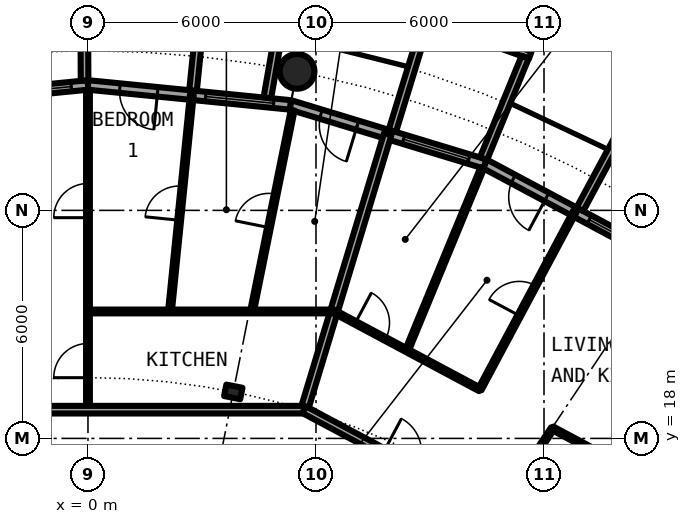
"""IFC4 building model, lengths in metres.
Left out: names, types, materials, properties, quantities, classifications, styles, units other than length and angle.
Written with IfcOpenShell. Run it as: python <this file> out.ifc"""

import sys

from ifc_helpers import new_model, si_unit, direction, frame, frame_2d, origin, origin_2d, place, context, subcontext, project, spatial, rectangle, circle, hollow_circle, i_section, extrude, element, fill, save


model = new_model("IFC4")
c1 = context("Model", 3, precision=1e-05, world=origin(), true_north=direction((0.0, 1.0)))
c2 = subcontext(c1, "Body", "Model", "MODEL_VIEW")
j1 = project(units=[si_unit("LENGTHUNIT", "METRE"), si_unit("PLANEANGLEUNIT", "RADIAN")], contexts=[c1])
p1 = place(None, origin())
s1 = spatial("IfcSite", under=j1, at=p1, CompositionType="ELEMENT")
p2 = place(p1, origin())
s2 = spatial("IfcBuilding", under=s1, at=p2, CompositionType="ELEMENT")
p3 = place(p2, frame((0.0, 0.0, 117.75)))
s3 = spatial("IfcBuildingStorey", under=s2, at=p3, CompositionType="ELEMENT", Elevation=117.75)
p4 = place(p3, frame((5.501, 27.658, 0.0), z_axis=(0.0, 0.0, 1.0), x_axis=(1.0, 0.0, 0.0)))
e1 = element("IfcColumn", 1, at=p4, inside=s3, PredefinedType="COLUMN", context=c2, shape_type="SweptSolid", body=[
    extrude(hollow_circle(Radius=0.457, WallThickness=0.04, at=origin_2d()), origin(), (0.0, 0.0, 1.0), 3.05),
])
p5 = place(p3, frame((3.824, 19.223, 0.0), z_axis=(0.0, 0.0, 1.0), x_axis=(0.195090322016, 0.980785280403, 0.0)))
e2 = element("IfcColumn", 2, at=p5, inside=s3, PredefinedType="COLUMN", context=c2, shape_type="SweptSolid", body=[
    extrude(i_section(OverallWidth=0.307, OverallDepth=0.432, WebThickness=0.021, FlangeThickness=0.04, FilletRadius=0.027, at=origin_2d()), origin(), (0.0, 0.0, 1.0), 3.05),
])
p6 = place(p3, frame((15.167, 22.699, 0.0), z_axis=(0.0, 0.0, 1.0), x_axis=(-0.881915646801, 0.471407246368, 0.0)))
e3 = element("IfcWall", 3, at=p6, inside=s3, PredefinedType="SOLIDWALL", context=c2, shape_type="SweptSolid", body=[
    extrude(rectangle(XDim=5.352, YDim=0.25, at=frame_2d((2.676, 0.0))), origin(), (0.0, 0.0, 1.0), 2.7),
])
p7 = place(p6, frame((0.441, 0.0, 0.3)))
e4 = element("IfcOpeningElement", 4, at=p7, cuts=e3, PredefinedType="OPENING", context=c2, shape_type="SweptSolid", body=[
    extrude(rectangle(XDim=1.8, YDim=2.1, at=frame_2d((0.9, 1.05))), frame((0.0, 0.135, 0.0), z_axis=(0.0, -1.0, 0.0), x_axis=(1.0, 0.0, 0.0)), (0.0, 0.0, 1.0), 0.27),
])
p8 = place(p6, frame((3.51, 0.0, 0.0)))
e5 = element("IfcOpeningElement", 5, at=p8, cuts=e3, PredefinedType="OPENING", context=c2, shape_type="SweptSolid", body=[
    extrude(rectangle(XDim=1.0, YDim=2.2, at=frame_2d((0.5, 1.1))), frame((0.0, 0.135, 0.0), z_axis=(0.0, -1.0, 0.0), x_axis=(1.0, 0.0, 0.0)), (0.0, 0.0, 1.0), 0.27),
])
p9 = place(p3, frame((12.945, 24.029, -0.03), z_axis=(0.0, 0.0, 1.0), x_axis=(0.474424310775, 0.88029629861, 0.0)))
e6 = element("IfcWall", 6, at=p9, inside=s3, PredefinedType="SOLIDWALL", context=c2, shape_type="SweptSolid", body=[
    extrude(rectangle(XDim=3.006, YDim=0.2, at=frame_2d((1.503, 0.0))), origin(), (0.0, 0.0, 1.0), 2.73),
])
p10 = place(p3, frame((10.447, 25.222, 0.0), z_axis=(0.0, 0.0, 1.0), x_axis=(-0.956965678721, 0.290201119486, 0.0)))
e7 = element("IfcWall", 7, at=p10, inside=s3, PredefinedType="SOLIDWALL", context=c2, shape_type="SweptSolid", body=[
    extrude(rectangle(XDim=5.351, YDim=0.25, at=frame_2d((2.676, 0.0))), origin(), (0.0, 0.0, 1.0), 2.7),
])
p11 = place(p10, frame((0.441, 0.0, 0.3)))
e8 = element("IfcOpeningElement", 8, at=p11, cuts=e7, PredefinedType="OPENING", context=c2, shape_type="SweptSolid", body=[
    extrude(rectangle(XDim=1.8, YDim=2.1, at=frame_2d((0.9, 1.05))), frame((0.0, 0.135, 0.0), z_axis=(0.0, -1.0, 0.0), x_axis=(1.0, 0.0, 0.0)), (0.0, 0.0, 1.0), 0.27),
])
p12 = place(p10, frame((3.51, 0.0, 0.0)))
e9 = element("IfcOpeningElement", 9, at=p12, cuts=e7, PredefinedType="OPENING", context=c2, shape_type="SweptSolid", body=[
    extrude(rectangle(XDim=1.0, YDim=2.2, at=frame_2d((0.5, 1.1))), frame((0.0, 0.135, 0.0), z_axis=(0.0, -1.0, 0.0), x_axis=(1.0, 0.0, 0.0)), (0.0, 0.0, 1.0), 0.27),
])
p13 = place(p3, frame((11.638, 28.084, -0.03), z_axis=(0.0, 0.0, 1.0), x_axis=(-0.941461077774, 0.337121697664, 0.0)))
e10 = element("IfcWall", 10, at=p13, inside=s3, PredefinedType="SOLIDWALL", context=c2, shape_type="SweptSolid", body=[
    extrude(rectangle(XDim=2.993, YDim=0.2, at=frame_2d((1.497, 0.0))), origin(), (0.0, 0.0, 1.0), 2.73),
])
p14 = place(p13, frame((0.457, 0.0, 0.33)))
e11 = element("IfcOpeningElement", 11, at=p14, cuts=e10, PredefinedType="OPENING", context=c2, shape_type="SweptSolid", body=[
    extrude(circle(Radius=1.04, at=frame_2d((1.04, 1.04))), frame((0.0, 0.11, 0.0), z_axis=(0.0, -1.0, 0.0), x_axis=(1.0, 0.0, 0.0)), (0.0, 0.0, 1.0), 0.22),
])
p15 = place(p3, frame((10.409, 25.364, -0.03), z_axis=(0.0, 0.0, 1.0), x_axis=(0.379509886562, 0.925187681501, 0.0)))
e12 = element("IfcWall", 12, at=p15, inside=s3, PredefinedType="SOLIDWALL", context=c2, shape_type="SweptSolid", body=[
    extrude(rectangle(XDim=2.883, YDim=0.2, at=frame_2d((1.441, 0.0))), origin(), (0.0, 0.0, 1.0), 2.73),
])
p16 = place(p3, frame((8.009, 26.092, -0.03), z_axis=(0.0, 0.0, 1.0), x_axis=(0.293406695073, 0.955987715029, 0.0)))
e13 = element("IfcWall", 13, at=p16, inside=s3, PredefinedType="SOLIDWALL", context=c2, shape_type="SweptSolid", body=[
    extrude(rectangle(XDim=3.006, YDim=0.2, at=frame_2d((1.503, 0.0))), origin(), (0.0, 0.0, 1.0), 2.73),
])
p17 = place(p3, frame((5.326, 26.775, 0.0), z_axis=(0.0, 0.0, 1.0), x_axis=(-0.995173996315, 0.098126026407, 0.0)))
e14 = element("IfcWall", 14, at=p17, inside=s3, PredefinedType="SOLIDWALL", context=c2, shape_type="SweptSolid", body=[
    extrude(rectangle(XDim=5.352, YDim=0.25, at=frame_2d((2.676, 0.0))), origin(), (0.0, 0.0, 1.0), 2.7),
])
p18 = place(p17, frame((0.441, 0.0, 0.3)))
e15 = element("IfcOpeningElement", 15, at=p18, cuts=e14, PredefinedType="OPENING", context=c2, shape_type="SweptSolid", body=[
    extrude(rectangle(XDim=1.8, YDim=2.1, at=frame_2d((0.9, 1.05))), frame((0.0, 0.135, 0.0), z_axis=(0.0, -1.0, 0.0), x_axis=(1.0, 0.0, 0.0)), (0.0, 0.0, 1.0), 0.27),
])
p19 = place(p17, frame((3.51, 0.0, 0.0)))
e16 = element("IfcOpeningElement", 16, at=p19, cuts=e14, PredefinedType="OPENING", context=c2, shape_type="SweptSolid", body=[
    extrude(rectangle(XDim=1.0, YDim=2.2, at=frame_2d((0.5, 1.1))), frame((0.0, 0.135, 0.0), z_axis=(0.0, -1.0, 0.0), x_axis=(1.0, 0.0, 0.0)), (0.0, 0.0, 1.0), 0.27),
])
p20 = place(p3, frame((4.72, 26.961, -0.03), z_axis=(0.0, 0.0, 1.0), x_axis=(0.172463232037, 0.98501595601, 0.0)))
e17 = element("IfcWall", 17, at=p20, inside=s3, PredefinedType="SOLIDWALL", context=c2, shape_type="SweptSolid", body=[
    extrude(rectangle(XDim=2.929, YDim=0.2, at=frame_2d((1.464, 0.0))), origin(), (0.0, 0.0, 1.0), 2.73),
])
p21 = place(p3, frame((2.764, 27.153, -0.03), z_axis=(0.0, 0.0, 1.0), x_axis=(0.101505487237, 0.994834979311, 0.0)))
e18 = element("IfcWall", 18, at=p21, inside=s3, PredefinedType="SOLIDWALL", context=c2, shape_type="SweptSolid", body=[
    extrude(rectangle(XDim=3.007, YDim=0.2, at=frame_2d((1.503, 0.0))), origin(), (0.0, 0.0, 1.0), 2.73),
])
p22 = place(p3, frame((0.0, 27.3, 0.0), z_axis=(0.0, 0.0, 1.0), x_axis=(-0.995173996315, -0.098126026407, 0.0)))
e19 = element("IfcWall", 19, at=p22, inside=s3, PredefinedType="SOLIDWALL", context=c2, shape_type="SweptSolid", body=[
    extrude(rectangle(XDim=5.352, YDim=0.25, at=frame_2d((2.676, 0.0))), origin(), (0.0, 0.0, 1.0), 2.7),
])
p23 = place(p22, frame((0.441, 0.0, 0.3)))
e20 = element("IfcOpeningElement", 20, at=p23, cuts=e19, PredefinedType="OPENING", context=c2, shape_type="SweptSolid", body=[
    extrude(rectangle(XDim=1.8, YDim=2.1, at=frame_2d((0.9, 1.05))), frame((0.0, 0.135, 0.0), z_axis=(0.0, -1.0, 0.0), x_axis=(1.0, 0.0, 0.0)), (0.0, 0.0, 1.0), 0.27),
])
p24 = place(p22, frame((3.51, 0.0, 0.0)))
e21 = element("IfcOpeningElement", 21, at=p24, cuts=e19, PredefinedType="OPENING", context=c2, shape_type="SweptSolid", body=[
    extrude(rectangle(XDim=1.0, YDim=2.2, at=frame_2d((0.5, 1.1))), frame((0.0, 0.135, 0.0), z_axis=(0.0, -1.0, 0.0), x_axis=(1.0, 0.0, 0.0)), (0.0, 0.0, 1.0), 0.27),
])
p25 = place(p3, frame((-0.09, 27.417, -0.03), z_axis=(0.0, 0.0, 1.0), x_axis=(-0.00347308367, 0.999993968827, 0.0)))
e22 = element("IfcWall", 22, at=p25, inside=s3, PredefinedType="SOLIDWALL", context=c2, shape_type="SweptSolid", body=[
    extrude(rectangle(XDim=2.882, YDim=0.2, at=frame_2d((1.441, 0.0))), origin(), (0.0, 0.0, 1.0), 2.73),
])
p26 = place(p3, frame((5.69, 18.756, 0.0), z_axis=(0.0, 0.0, 1.0), x_axis=(0.29005838641, 0.957008951094, 0.0)))
e23 = element("IfcWall", 23, at=p26, inside=s3, PredefinedType="PARTITIONING", context=c2, shape_type="SweptSolid", body=[
    extrude(rectangle(XDim=7.574, YDim=0.2, at=frame_2d((3.787, 0.0))), origin(), (0.0, 0.0, 1.0), 2.7),
])
p27 = place(p3, frame((0.0, 18.756, 0.0), z_axis=(0.0, 0.0, 1.0), x_axis=(0.0, 1.0, 0.0)))
e24 = element("IfcWall", 24, at=p27, inside=s3, PredefinedType="PARTITIONING", context=c2, shape_type="SweptSolid", body=[
    extrude(rectangle(XDim=8.419, YDim=0.1, at=frame_2d((4.209, 0.0))), origin(), (0.0, 0.0, 1.0), 2.7),
])
p28 = place(p27, frame((0.842, 0.0, 0.0)))
e25 = element("IfcOpeningElement", 25, at=p28, cuts=e24, PredefinedType="OPENING", context=c2, shape_type="SweptSolid", body=[
    extrude(rectangle(XDim=0.9, YDim=2.3, at=frame_2d((0.45, 1.15))), frame((0.0, 0.06, 0.0), z_axis=(0.0, -1.0, 0.0), x_axis=(1.0, 0.0, 0.0)), (0.0, 0.0, 1.0), 0.12),
])
p29 = place(p27, frame((5.052, 0.0, 0.0)))
e26 = element("IfcOpeningElement", 26, at=p29, cuts=e24, PredefinedType="OPENING", context=c2, shape_type="SweptSolid", body=[
    extrude(rectangle(XDim=0.9, YDim=2.3, at=frame_2d((0.45, 1.15))), frame((0.0, 0.06, 0.0), z_axis=(0.0, -1.0, 0.0), x_axis=(1.0, 0.0, 0.0)), (0.0, 0.0, 1.0), 0.12),
])
p30 = place(p3, frame((2.157, 21.34, 0.0), z_axis=(0.0, 0.0, 1.0), x_axis=(0.100580133625, 0.99492896064, 0.0)))
e27 = element("IfcWall", 27, at=p30, inside=s3, PredefinedType="PARTITIONING", context=c2, shape_type="SweptSolid", body=[
    extrude(rectangle(XDim=5.726, YDim=0.1, at=frame_2d((2.863, 0.0))), origin(), (0.0, 0.0, 1.0), 2.7),
])
p31 = place(p30, frame((2.413, 0.0, 0.0)))
e28 = element("IfcOpeningElement", 28, at=p31, cuts=e27, PredefinedType="OPENING", context=c2, shape_type="SweptSolid", body=[
    extrude(rectangle(XDim=0.9, YDim=2.3, at=frame_2d((0.45, 1.15))), frame((0.0, 0.06, 0.0), z_axis=(0.0, -1.0, 0.0), x_axis=(1.0, 0.0, 0.0)), (0.0, 0.0, 1.0), 0.12),
])
p32 = place(p3, frame((4.316, 21.34, 0.0), z_axis=(0.0, 0.0, 1.0), x_axis=(0.198227216881, 0.98015609496, 0.0)))
e29 = element("IfcWall", 29, at=p32, inside=s3, PredefinedType="PARTITIONING", context=c2, shape_type="SweptSolid", body=[
    extrude(rectangle(XDim=5.403, YDim=0.1, at=frame_2d((2.702, 0.0))), origin(), (0.0, 0.0, 1.0), 2.7),
])
p33 = place(p32, frame((2.252, 0.0, 0.0)))
e30 = element("IfcOpeningElement", 30, at=p33, cuts=e29, PredefinedType="OPENING", context=c2, shape_type="SweptSolid", body=[
    extrude(rectangle(XDim=0.9, YDim=2.3, at=frame_2d((0.45, 1.15))), frame((0.0, 0.06, 0.0), z_axis=(0.0, -1.0, 0.0), x_axis=(1.0, 0.0, 0.0)), (0.0, 0.0, 1.0), 0.12),
])
p34 = place(p3, frame((8.392, 20.314, 0.0), z_axis=(0.0, 0.0, 1.0), x_axis=(0.381673756215, 0.924297107978, 0.0)))
e31 = element("IfcWall", 31, at=p34, inside=s3, PredefinedType="PARTITIONING", context=c2, shape_type="SweptSolid", body=[
    extrude(rectangle(XDim=5.195, YDim=0.1, at=frame_2d((2.598, 0.0))), origin(), (0.0, 0.0, 1.0), 2.7),
])
p35 = place(p3, frame((10.31, 19.289, 0.0), z_axis=(0.0, 0.0, 1.0), x_axis=(0.47140999111, 0.881914179658, 0.0)))
e32 = element("IfcWall", 32, at=p35, inside=s3, PredefinedType="PARTITIONING", context=c2, shape_type="SweptSolid", body=[
    extrude(rectangle(XDim=5.303, YDim=0.1, at=frame_2d((2.652, 0.0))), origin(), (0.0, 0.0, 1.0), 2.7),
])
p36 = place(p35, frame((2.202, 0.0, 0.0)))
e33 = element("IfcOpeningElement", 33, at=p36, cuts=e32, PredefinedType="OPENING", context=c2, shape_type="SweptSolid", body=[
    extrude(rectangle(XDim=0.9, YDim=2.3, at=frame_2d((0.45, 1.15))), frame((0.0, 0.06, 0.0), z_axis=(0.0, -1.0, 0.0), x_axis=(1.0, 0.0, 0.0)), (0.0, 0.0, 1.0), 0.12),
])
p37 = place(p3, frame((11.025, 16.466, 0.0), z_axis=(0.0, 0.0, 1.0), x_axis=(0.556469477731, 0.830868052313, 0.0)))
e34 = element("IfcWall", 34, at=p37, inside=s3, PredefinedType="PARTITIONING", context=c2, shape_type="SweptSolid", body=[
    extrude(rectangle(XDim=2.164, YDim=0.1, at=frame_2d((1.082, 0.0))), origin(), (0.0, 0.0, 1.0), 2.7),
])
p38 = place(p37, frame((0.383, 0.0, 0.0)))
e35 = element("IfcOpeningElement", 35, at=p38, cuts=e34, PredefinedType="OPENING", context=c2, shape_type="SweptSolid", body=[
    extrude(rectangle(XDim=0.9, YDim=2.3, at=frame_2d((0.45, 1.15))), frame((0.0, 0.06, 0.0), z_axis=(0.0, -1.0, 0.0), x_axis=(1.0, 0.0, 0.0)), (0.0, 0.0, 1.0), 0.12),
])
p39 = place(p3, frame((12.436, 15.149, 0.0), z_axis=(0.0, 0.0, 1.0), x_axis=(0.63447412651, 0.772944100689, 0.0)))
e36 = element("IfcWall", 36, at=p39, inside=s3, PredefinedType="PARTITIONING", context=c2, shape_type="SweptSolid", body=[
    extrude(rectangle(XDim=7.576, YDim=0.2, at=frame_2d((3.788, 0.0))), origin(), (0.0, 0.0, 1.0), 2.7),
])
p40 = place(p3, frame((-5.69, 18.756, 0.0), z_axis=(0.0, 0.0, 1.0), x_axis=(1.0, 0.0, 0.0)))
e37 = element("IfcWall", 37, at=p40, inside=s3, PredefinedType="PARTITIONING", context=c2, shape_type="SweptSolid", body=[
    extrude(rectangle(XDim=11.38, YDim=0.2, at=frame_2d((5.69, 0.0))), origin(), (0.0, 0.0, 1.0), 2.7),
])
p41 = place(p40, frame((3.294, 0.0, 0.0)))
e38 = element("IfcOpeningElement", 38, at=p41, cuts=e37, PredefinedType="OPENING", context=c2, shape_type="SweptSolid", body=[
    extrude(rectangle(XDim=1.0, YDim=2.3, at=frame_2d((0.5, 1.15))), frame((0.0, 0.11, 0.0), z_axis=(0.0, -1.0, 0.0), x_axis=(1.0, 0.0, 0.0)), (0.0, 0.0, 1.0), 0.22),
])
p42 = place(p3, frame((5.687, 18.757, 0.0), z_axis=(0.0, 0.0, 1.0), x_axis=(0.8819312112, -0.471378127104, 0.0)))
e39 = element("IfcWall", 39, at=p42, inside=s3, PredefinedType="PARTITIONING", context=c2, shape_type="SweptSolid", body=[
    extrude(rectangle(XDim=7.65, YDim=0.2, at=frame_2d((3.825, 0.0))), origin(), (0.0, 0.0, 1.0), 2.39),
])
p43 = place(p42, frame((2.371, 0.0, 0.0)))
e40 = element("IfcOpeningElement", 40, at=p43, cuts=e39, PredefinedType="OPENING", context=c2, shape_type="SweptSolid", body=[
    extrude(rectangle(XDim=1.0, YDim=2.3, at=frame_2d((0.5, 1.15))), frame((0.0, 0.11, 0.0), z_axis=(0.0, -1.0, 0.0), x_axis=(1.0, 0.0, 0.0)), (0.0, 0.0, 1.0), 0.22),
])
p44 = place(p3, frame((0.0, 21.34, 0.0), z_axis=(0.0, 0.0, 1.0), x_axis=(1.0, 0.0, 0.0)))
e41 = element("IfcWall", 41, at=p44, inside=s3, PredefinedType="PARTITIONING", context=c2, shape_type="SweptSolid", body=[
    extrude(rectangle(XDim=6.473, YDim=0.1, at=frame_2d((3.236, 0.0))), origin(), (0.0, 0.0, 1.0), 2.7),
])
p45 = place(p3, frame((6.471, 21.341, 0.0), z_axis=(0.0, 0.0, 1.0), x_axis=(0.881932070463, -0.471376519451, 0.0)))
e42 = element("IfcWall", 42, at=p45, inside=s3, PredefinedType="PARTITIONING", context=c2, shape_type="SweptSolid", body=[
    extrude(rectangle(XDim=4.355, YDim=0.1, at=frame_2d((2.178, 0.0))), origin(), (0.0, 0.0, 1.0), 2.7),
])
p46 = place(p45, frame((0.639, 0.0, 0.0)))
e43 = element("IfcOpeningElement", 43, at=p46, cuts=e42, PredefinedType="OPENING", context=c2, shape_type="SweptSolid", body=[
    extrude(rectangle(XDim=0.9, YDim=2.3, at=frame_2d((0.45, 1.15))), frame((0.0, 0.06, 0.0), z_axis=(0.0, -1.0, 0.0), x_axis=(1.0, 0.0, 0.0)), (0.0, 0.0, 1.0), 0.12),
])
p47 = place(p3, frame((12.223, 18.267, 0.0), z_axis=(0.0, 0.0, 1.0), x_axis=(0.881765102974, -0.47168877788, 0.0)))
e44 = element("IfcWall", 44, at=p47, inside=s3, PredefinedType="PARTITIONING", context=c2, shape_type="SweptSolid", body=[
    extrude(rectangle(XDim=2.176, YDim=0.1, at=frame_2d((1.088, 0.0))), origin(), (0.0, 0.0, 1.0), 2.7),
])
p48 = place(p7, origin())
e45 = element("IfcWindow", 45, at=p48, inside=s3, PartitioningType="SINGLE_PANEL", PredefinedType="WINDOW", context=c2, shape_type="SweptSolid", body=[
    extrude(rectangle(XDim=1.8, YDim=2.1, at=frame_2d((0.9, 1.05))), frame((0.0, 0.03, 0.0), z_axis=(0.0, -1.0, 0.0), x_axis=(1.0, 0.0, 0.0)), (0.0, 0.0, 1.0), 0.06),
])
fill(e4, e45)
p49 = place(p8, origin())
e46 = element("IfcDoor", 46, at=p49, inside=s3, OperationType="SINGLE_SWING_LEFT", PredefinedType="DOOR", context=c2, shape_type="SweptSolid", body=[
    extrude(rectangle(XDim=1.0, YDim=2.2, at=frame_2d((0.5, 1.1))), frame((0.0, 0.025, 0.0), z_axis=(0.0, -1.0, 0.0), x_axis=(1.0, 0.0, 0.0)), (0.0, 0.0, 1.0), 0.05),
])
fill(e5, e46)
p50 = place(p11, origin())
e47 = element("IfcWindow", 47, at=p50, inside=s3, PartitioningType="SINGLE_PANEL", PredefinedType="WINDOW", context=c2, shape_type="SweptSolid", body=[
    extrude(rectangle(XDim=1.8, YDim=2.1, at=frame_2d((0.9, 1.05))), frame((0.0, 0.03, 0.0), z_axis=(0.0, -1.0, 0.0), x_axis=(1.0, 0.0, 0.0)), (0.0, 0.0, 1.0), 0.06),
])
fill(e8, e47)
p51 = place(p12, origin())
e48 = element("IfcDoor", 48, at=p51, inside=s3, OperationType="SINGLE_SWING_LEFT", PredefinedType="DOOR", context=c2, shape_type="SweptSolid", body=[
    extrude(rectangle(XDim=1.0, YDim=2.2, at=frame_2d((0.5, 1.1))), frame((0.0, 0.025, 0.0), z_axis=(0.0, -1.0, 0.0), x_axis=(1.0, 0.0, 0.0)), (0.0, 0.0, 1.0), 0.05),
])
fill(e9, e48)
p52 = place(p18, origin())
e49 = element("IfcWindow", 49, at=p52, inside=s3, PartitioningType="SINGLE_PANEL", PredefinedType="WINDOW", context=c2, shape_type="SweptSolid", body=[
    extrude(rectangle(XDim=1.8, YDim=2.1, at=frame_2d((0.9, 1.05))), frame((0.0, 0.03, 0.0), z_axis=(0.0, -1.0, 0.0), x_axis=(1.0, 0.0, 0.0)), (0.0, 0.0, 1.0), 0.06),
])
fill(e15, e49)
p53 = place(p19, origin())
e50 = element("IfcDoor", 50, at=p53, inside=s3, OperationType="SINGLE_SWING_LEFT", PredefinedType="DOOR", context=c2, shape_type="SweptSolid", body=[
    extrude(rectangle(XDim=1.0, YDim=2.2, at=frame_2d((0.5, 1.1))), frame((0.0, 0.025, 0.0), z_axis=(0.0, -1.0, 0.0), x_axis=(1.0, 0.0, 0.0)), (0.0, 0.0, 1.0), 0.05),
])
fill(e16, e50)
p54 = place(p23, origin())
e51 = element("IfcWindow", 51, at=p54, inside=s3, PartitioningType="SINGLE_PANEL", PredefinedType="WINDOW", context=c2, shape_type="SweptSolid", body=[
    extrude(rectangle(XDim=1.8, YDim=2.1, at=frame_2d((0.9, 1.05))), frame((0.0, 0.03, 0.0), z_axis=(0.0, -1.0, 0.0), x_axis=(1.0, 0.0, 0.0)), (0.0, 0.0, 1.0), 0.06),
])
fill(e20, e51)
p55 = place(p36, origin())
e52 = element("IfcDoor", 52, at=p55, inside=s3, OperationType="SINGLE_SWING_RIGHT", PredefinedType="DOOR", context=c2, shape_type="SweptSolid", body=[
    extrude(rectangle(XDim=0.9, YDim=2.3, at=frame_2d((0.45, 1.15))), frame((0.0, 0.025, 0.0), z_axis=(0.0, -1.0, 0.0), x_axis=(1.0, 0.0, 0.0)), (0.0, 0.0, 1.0), 0.05),
])
fill(e33, e52)
p56 = place(p46, origin())
e53 = element("IfcDoor", 53, at=p56, inside=s3, OperationType="SINGLE_SWING_LEFT", PredefinedType="DOOR", context=c2, shape_type="SweptSolid", body=[
    extrude(rectangle(XDim=0.9, YDim=2.3, at=frame_2d((0.45, 1.15))), frame((0.0, 0.025, 0.0), z_axis=(0.0, -1.0, 0.0), x_axis=(1.0, 0.0, 0.0)), (0.0, 0.0, 1.0), 0.05),
])
fill(e43, e53)
p57 = place(p28, origin())
e54 = element("IfcDoor", 54, at=p57, inside=s3, OperationType="SINGLE_SWING_LEFT", PredefinedType="DOOR", context=c2, shape_type="SweptSolid", body=[
    extrude(rectangle(XDim=0.9, YDim=2.3, at=frame_2d((0.45, 1.15))), frame((0.0, 0.025, 0.0), z_axis=(0.0, -1.0, 0.0), x_axis=(1.0, 0.0, 0.0)), (0.0, 0.0, 1.0), 0.05),
])
fill(e25, e54)
p58 = place(p29, origin())
e55 = element("IfcDoor", 55, at=p58, inside=s3, OperationType="SINGLE_SWING_RIGHT", PredefinedType="DOOR", context=c2, shape_type="SweptSolid", body=[
    extrude(rectangle(XDim=0.9, YDim=2.3, at=frame_2d((0.45, 1.15))), frame((0.0, 0.025, 0.0), z_axis=(0.0, -1.0, 0.0), x_axis=(1.0, 0.0, 0.0)), (0.0, 0.0, 1.0), 0.05),
])
fill(e26, e55)
p59 = place(p31, origin())
e56 = element("IfcDoor", 56, at=p59, inside=s3, OperationType="SINGLE_SWING_RIGHT", PredefinedType="DOOR", context=c2, shape_type="SweptSolid", body=[
    extrude(rectangle(XDim=0.9, YDim=2.3, at=frame_2d((0.45, 1.15))), frame((0.0, 0.025, 0.0), z_axis=(0.0, -1.0, 0.0), x_axis=(1.0, 0.0, 0.0)), (0.0, 0.0, 1.0), 0.05),
])
fill(e28, e56)
p60 = place(p33, origin())
e57 = element("IfcDoor", 57, at=p60, inside=s3, OperationType="SINGLE_SWING_RIGHT", PredefinedType="DOOR", context=c2, shape_type="SweptSolid", body=[
    extrude(rectangle(XDim=0.9, YDim=2.3, at=frame_2d((0.45, 1.15))), frame((0.0, 0.025, 0.0), z_axis=(0.0, -1.0, 0.0), x_axis=(1.0, 0.0, 0.0)), (0.0, 0.0, 1.0), 0.05),
])
fill(e30, e57)
save(model, sys.argv[1])
